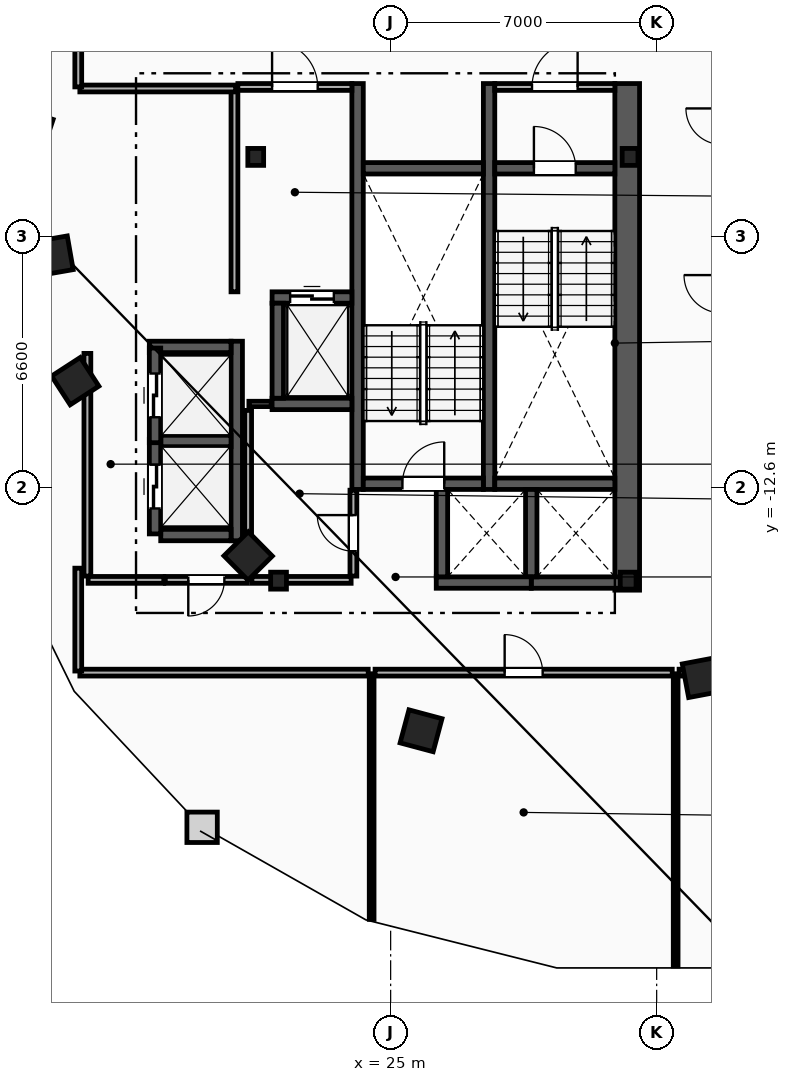
"""IFC4 building model, lengths in metres.
Left out: names, types, materials, properties, quantities, classifications, styles, units other than length and angle.
Written with IfcOpenShell. Run it as: python <this file> out.ifc"""

import sys

from ifc_helpers import new_model, si_unit, direction, frame, frame_2d, origin, origin_2d, place, context, subcontext, project, spatial, rectangle, i_section, extrude, element, fill, save


model = new_model("IFC4")
c1 = context("Model", 3, precision=1e-05, world=origin(), true_north=direction((0.0, 1.0)))
c2 = subcontext(c1, "Body", "Model", "MODEL_VIEW")
j1 = project(units=[si_unit("LENGTHUNIT", "METRE"), si_unit("PLANEANGLEUNIT", "RADIAN")], contexts=[c1])
p1 = place(None, origin())
s1 = spatial("IfcSite", under=j1, at=p1, CompositionType="ELEMENT")
p2 = place(p1, origin())
s2 = spatial("IfcBuilding", under=s1, at=p2, CompositionType="ELEMENT")
p3 = place(p2, frame((0.0, 0.0, 220.6)))
s3 = spatial("IfcBuildingStorey", under=s2, at=p3, CompositionType="ELEMENT", Elevation=220.6)
for number, where, z_axis, x_axis in (
    (1, (31.3, -3.9, 0.0), (0.0, 0.0, 1.0), (1.0, 0.0, 0.0)),
    (2, (21.45, -3.9, 0.0), (0.0, 0.0, 1.0), (1.0, 0.0, 0.0)),
    (3, (22.05, -15.05, 0.0), (0.0, 0.0, 1.0), (1.0, 0.0, 0.0)),
    (4, (31.25, -15.05, 0.0), (0.0, 0.0, 1.0), (1.0, 0.0, 0.0)),
):
    element("IfcColumn", number, at=place(p3, frame(where, z_axis=z_axis, x_axis=x_axis)), inside=s3, PredefinedType="COLUMN", context=c2, shape_type="SweptSolid", body=[
        extrude(i_section(OverallWidth=0.416, OverallDepth=0.446, WebThickness=0.039, FlangeThickness=0.063, FilletRadius=0.018, at=origin_2d()), origin(), (0.0, 0.0, 1.0), 3.6),
    ])
for number, where, z_axis, x_axis in (
    (5, (15.55, -3.2, 0.0), (0.0, 0.0, 1.0), (-0.315, -0.949, 0.0)),
    (6, (16.125, -6.5, 0.0), (0.0, 0.0, 1.0), (0.172, -0.985, 0.0)),
    (7, (16.7, -9.8, 0.0), (0.0, 0.0, 1.0), (0.544, -0.839, 0.0)),
    (8, (21.25, -14.4, 0.0), (0.0, 0.0, 1.0), (0.703, -0.711, 0.0)),
    (9, (25.8, -19.0, 0.0), (0.0, 0.0, 1.0), (0.966, -0.259, 0.0)),
    (10, (33.2, -17.6, 0.0), (0.0, 0.0, 1.0), (0.983, 0.186, 0.0)),
):
    element("IfcColumn", number, at=place(p3, frame(where, z_axis=z_axis, x_axis=x_axis)), inside=s3, PredefinedType="COLUMN", context=c2, shape_type="SweptSolid", body=[
        extrude(rectangle(XDim=0.9, YDim=0.9, at=origin_2d()), origin(), (0.0, 0.0, 1.0), 3.6),
    ])
p4 = place(p3, frame((31.225, -15.3, 0.0), z_axis=(0.0, 0.0, 1.0), x_axis=(0.0, 1.0, 0.0)))
e11 = element("IfcWall", 11, at=p4, inside=s3, PredefinedType="SHEAR", context=c2, shape_type="SweptSolid", body=[
    extrude(rectangle(XDim=13.33, YDim=0.65, at=frame_2d((6.665, 0.0))), origin(), (0.0, 0.0, 1.0), 3.34),
])
for number, where, z_axis, x_axis in (
    (12, (27.59, -12.65, 0.0), (0.0, 0.0, 1.0), (0.0, 1.0, 0.0)),
    (13, (24.13, -12.65, 0.0), (0.0, 0.0, 1.0), (0.0, 1.0, 0.0)),
):
    element("IfcWall", number, at=place(p3, frame(where, z_axis=z_axis, x_axis=x_axis)), inside=s3, PredefinedType="SHEAR", context=c2, shape_type="SweptSolid", body=[
        extrude(rectangle(XDim=10.68, YDim=0.3, at=frame_2d((5.34, 0.0))), origin(), (0.0, 0.0, 1.0), 3.34),
    ])
p5 = place(p3, frame((27.74, -4.2, 0.0), z_axis=(0.0, 0.0, 1.0), x_axis=(1.0, 0.0, 0.0)))
e14 = element("IfcWall", 14, at=p5, inside=s3, PredefinedType="SHEAR", context=c2, shape_type="SweptSolid", body=[
    extrude(rectangle(XDim=3.16, YDim=0.3, at=frame_2d((1.58, 0.0))), origin(), (0.0, 0.0, 1.0), 3.34),
])
p6 = place(p5, frame((1.03, 0.0, 0.0)))
e15 = element("IfcOpeningElement", 15, at=p6, cuts=e14, PredefinedType="OPENING", context=c2, shape_type="SweptSolid", body=[
    extrude(rectangle(XDim=1.1, YDim=2.15, at=frame_2d((0.55, 1.075))), frame((0.0, 0.16, 0.0), z_axis=(0.0, -1.0, 0.0), x_axis=(1.0, 0.0, 0.0)), (0.0, 0.0, 1.0), 0.32),
])
p7 = place(p3, frame((27.74, -12.5, 0.0), z_axis=(0.0, 0.0, 1.0), x_axis=(1.0, 0.0, 0.0)))
e16 = element("IfcWall", 16, at=p7, inside=s3, PredefinedType="SHEAR", context=c2, shape_type="SweptSolid", body=[
    extrude(rectangle(XDim=3.16, YDim=0.3, at=frame_2d((1.58, 0.0))), origin(), (0.0, 0.0, 1.0), 3.34),
])
p8 = place(p3, frame((24.28, -12.5, 0.0), z_axis=(0.0, 0.0, 1.0), x_axis=(1.0, 0.0, 0.0)))
e17 = element("IfcWall", 17, at=p8, inside=s3, PredefinedType="SHEAR", context=c2, shape_type="SweptSolid", body=[
    extrude(rectangle(XDim=3.16, YDim=0.3, at=frame_2d((1.58, 0.0))), origin(), (0.0, 0.0, 1.0), 3.34),
])
p9 = place(p8, frame((1.03, 0.0, 0.0)))
e18 = element("IfcOpeningElement", 18, at=p9, cuts=e17, PredefinedType="OPENING", context=c2, shape_type="SweptSolid", body=[
    extrude(rectangle(XDim=1.1, YDim=2.15, at=frame_2d((0.55, 1.075))), frame((0.0, 0.16, 0.0), z_axis=(0.0, -1.0, 0.0), x_axis=(1.0, 0.0, 0.0)), (0.0, 0.0, 1.0), 0.32),
])
p10 = place(p3, frame((24.28, -4.2, 0.0), z_axis=(0.0, 0.0, 1.0), x_axis=(1.0, 0.0, 0.0)))
e19 = element("IfcWall", 19, at=p10, inside=s3, PredefinedType="SHEAR", context=c2, shape_type="SweptSolid", body=[
    extrude(rectangle(XDim=3.16, YDim=0.3, at=frame_2d((1.58, 0.0))), origin(), (0.0, 0.0, 1.0), 3.34),
])
p11 = place(p3, frame((20.89, -7.45, 0.0), z_axis=(0.0, 0.0, 1.0), x_axis=(0.0, 1.0, 0.0)))
e20 = element("IfcWall", 20, at=p11, inside=s3, PredefinedType="PARTITIONING", context=c2, shape_type="SweptSolid", body=[
    extrude(rectangle(XDim=5.3, YDim=0.18, at=frame_2d((2.65, 0.0))), origin(), (0.0, 0.0, 1.0), 3.34),
])
p12 = place(p3, frame((20.98, -2.06, 0.0), z_axis=(0.0, 0.0, 1.0), x_axis=(1.0, 0.0, 0.0)))
e21 = element("IfcWall", 21, at=p12, inside=s3, PredefinedType="PARTITIONING", context=c2, shape_type="SweptSolid", body=[
    extrude(rectangle(XDim=3.0, YDim=0.18, at=frame_2d((1.5, 0.0))), origin(), (0.0, 0.0, 1.0), 3.34),
])
p13 = place(p12, frame((0.9, 0.0, 0.0)))
e22 = element("IfcOpeningElement", 22, at=p13, cuts=e21, PredefinedType="OPENING", context=c2, shape_type="SweptSolid", body=[
    extrude(rectangle(XDim=1.2, YDim=2.15, at=frame_2d((0.6, 1.075))), frame((0.0, 0.1, 0.0), z_axis=(0.0, -1.0, 0.0), x_axis=(1.0, 0.0, 0.0)), (0.0, 0.0, 1.0), 0.2),
])
p14 = place(p3, frame((27.74, -2.06, 0.0), z_axis=(0.0, 0.0, 1.0), x_axis=(1.0, 0.0, 0.0)))
e23 = element("IfcWall", 23, at=p14, inside=s3, PredefinedType="PARTITIONING", context=c2, shape_type="SweptSolid", body=[
    extrude(rectangle(XDim=3.16, YDim=0.18, at=frame_2d((1.58, 0.0))), origin(), (0.0, 0.0, 1.0), 3.34),
])
p15 = place(p14, frame((0.98, 0.0, 0.0)))
e24 = element("IfcOpeningElement", 24, at=p15, cuts=e23, PredefinedType="OPENING", context=c2, shape_type="SweptSolid", body=[
    extrude(rectangle(XDim=1.2, YDim=2.15, at=frame_2d((0.6, 1.075))), frame((0.0, 0.1, 0.0), z_axis=(0.0, -1.0, 0.0), x_axis=(1.0, 0.0, 0.0)), (0.0, 0.0, 1.0), 0.2),
])
p16 = place(p3, frame((21.88, -7.6, 0.0), z_axis=(0.0, 0.0, 1.0), x_axis=(1.0, 0.0, 0.0)))
e25 = element("IfcWall", 25, at=p16, inside=s3, PredefinedType="SHEAR", context=c2, shape_type="SweptSolid", body=[
    extrude(rectangle(XDim=2.1, YDim=0.3, at=frame_2d((1.05, 0.0))), origin(), (0.0, 0.0, 1.0), 3.34),
])
p17 = place(p16, frame((0.475, 0.0, 0.0)))
e26 = element("IfcOpeningElement", 26, at=p17, cuts=e25, PredefinedType="OPENING", context=c2, shape_type="SweptSolid", body=[
    extrude(rectangle(XDim=1.15, YDim=2.2, at=frame_2d((0.575, 1.1))), frame((0.0, 0.16, 0.0), z_axis=(0.0, -1.0, 0.0), x_axis=(1.0, 0.0, 0.0)), (0.0, 0.0, 1.0), 0.32),
])
p18 = place(p3, frame((21.88, -10.4, 0.0), z_axis=(0.0, 0.0, 1.0), x_axis=(1.0, 0.0, 0.0)))
e27 = element("IfcWall", 27, at=p18, inside=s3, PredefinedType="SHEAR", context=c2, shape_type="SweptSolid", body=[
    extrude(rectangle(XDim=2.1, YDim=0.3, at=frame_2d((1.05, 0.0))), origin(), (0.0, 0.0, 1.0), 3.34),
])
for number, where, z_axis, x_axis in (
    (28, (22.03, -10.25, 0.0), (0.0, 0.0, 1.0), (0.0, 1.0, 0.0)),
    (29, (28.7, -15.1, 0.0), (0.0, 0.0, 1.0), (1.0, 0.0, 0.0)),
):
    element("IfcWall", number, at=place(p3, frame(where, z_axis=z_axis, x_axis=x_axis)), inside=s3, PredefinedType="SHEAR", context=c2, shape_type="SweptSolid", body=[
        extrude(rectangle(XDim=2.5, YDim=0.3, at=frame_2d((1.25, 0.0))), origin(), (0.0, 0.0, 1.0), 3.34),
    ])
p19 = place(p3, frame((28.7, -14.95, 0.0), z_axis=(0.0, 0.0, 1.0), x_axis=(0.0, 1.0, 0.0)))
e30 = element("IfcWall", 30, at=p19, inside=s3, PredefinedType="SHEAR", context=c2, shape_type="SweptSolid", body=[
    extrude(rectangle(XDim=2.3, YDim=0.3, at=frame_2d((1.15, 0.0))), origin(), (0.0, 0.0, 1.0), 3.34),
])
p20 = place(p3, frame((26.2, -15.1, 0.0), z_axis=(0.0, 0.0, 1.0), x_axis=(1.0, 0.0, 0.0)))
e31 = element("IfcWall", 31, at=p20, inside=s3, PredefinedType="SHEAR", context=c2, shape_type="SweptSolid", body=[
    extrude(rectangle(XDim=2.5, YDim=0.3, at=frame_2d((1.25, 0.0))), origin(), (0.0, 0.0, 1.0), 3.34),
])
p21 = place(p3, frame((26.35, -14.95, 0.0), z_axis=(0.0, 0.0, 1.0), x_axis=(0.0, 1.0, 0.0)))
e32 = element("IfcWall", 32, at=p21, inside=s3, PredefinedType="SHEAR", context=c2, shape_type="SweptSolid", body=[
    extrude(rectangle(XDim=2.3, YDim=0.3, at=frame_2d((1.15, 0.0))), origin(), (0.0, 0.0, 1.0), 3.34),
])
p22 = place(p3, frame((20.95, -14.0, 0.0), z_axis=(0.0, 0.0, 1.0), x_axis=(0.0, 1.0, 0.0)))
e33 = element("IfcWall", 33, at=p22, inside=s3, PredefinedType="SHEAR", context=c2, shape_type="SweptSolid", body=[
    extrude(rectangle(XDim=5.25, YDim=0.3, at=frame_2d((2.625, 0.0))), origin(), (0.0, 0.0, 1.0), 3.34),
])
p23 = place(p3, frame((18.95, -13.85, 0.0), z_axis=(0.0, 0.0, 1.0), x_axis=(1.0, 0.0, 0.0)))
e34 = element("IfcWall", 34, at=p23, inside=s3, PredefinedType="SHEAR", context=c2, shape_type="SweptSolid", body=[
    extrude(rectangle(XDim=1.85, YDim=0.3, at=frame_2d((0.925, 0.0))), origin(), (0.0, 0.0, 1.0), 3.34),
])
p24 = place(p3, frame((18.65, -8.9, 0.0), z_axis=(0.0, 0.0, 1.0), x_axis=(1.0, 0.0, 0.0)))
e35 = element("IfcWall", 35, at=p24, inside=s3, PredefinedType="SHEAR", context=c2, shape_type="SweptSolid", body=[
    extrude(rectangle(XDim=2.15, YDim=0.3, at=frame_2d((1.075, 0.0))), origin(), (0.0, 0.0, 1.0), 3.34),
])
p25 = place(p3, frame((18.95, -11.375, 0.0), z_axis=(0.0, 0.0, 1.0), x_axis=(1.0, 0.0, 0.0)))
e36 = element("IfcWall", 36, at=p25, inside=s3, PredefinedType="SHEAR", context=c2, shape_type="SweptSolid", body=[
    extrude(rectangle(XDim=1.85, YDim=0.3, at=frame_2d((0.925, 0.0))), origin(), (0.0, 0.0, 1.0), 3.34),
])
p26 = place(p3, frame((18.8, -13.82, 0.0), z_axis=(0.0, 0.0, 1.0), x_axis=(0.0, 1.0, 0.0)))
e37 = element("IfcWall", 37, at=p26, inside=s3, PredefinedType="SHEAR", context=c2, shape_type="SweptSolid", body=[
    extrude(rectangle(XDim=2.49, YDim=0.3, at=frame_2d((1.245, 0.0))), origin(), (0.0, 0.0, 1.0), 3.34),
])
p27 = place(p26, frame((0.67, 0.0, 0.0)))
e38 = element("IfcOpeningElement", 38, at=p27, cuts=e37, PredefinedType="OPENING", context=c2, shape_type="SweptSolid", body=[
    extrude(rectangle(XDim=1.15, YDim=2.2, at=frame_2d((0.575, 1.1))), frame((0.0, 0.16, 0.0), z_axis=(0.0, -1.0, 0.0), x_axis=(1.0, 0.0, 0.0)), (0.0, 0.0, 1.0), 0.32),
])
p28 = place(p3, frame((18.8, -11.42, 0.0), z_axis=(0.0, 0.0, 1.0), x_axis=(0.0, 1.0, 0.0)))
e39 = element("IfcWall", 39, at=p28, inside=s3, PredefinedType="SHEAR", context=c2, shape_type="SweptSolid", body=[
    extrude(rectangle(XDim=2.49, YDim=0.3, at=frame_2d((1.245, 0.0))), origin(), (0.0, 0.0, 1.0), 3.34),
])
p29 = place(p28, frame((0.67, 0.0, 0.0)))
e40 = element("IfcOpeningElement", 40, at=p29, cuts=e39, PredefinedType="OPENING", context=c2, shape_type="SweptSolid", body=[
    extrude(rectangle(XDim=1.15, YDim=2.2, at=frame_2d((0.575, 1.1))), frame((0.0, 0.16, 0.0), z_axis=(0.0, -1.0, 0.0), x_axis=(1.0, 0.0, 0.0)), (0.0, 0.0, 1.0), 0.32),
])
p30 = place(p3, frame((17.02, -14.93, 0.0), z_axis=(0.0, 0.0, 1.0), x_axis=(0.0, 1.0, 0.0)))
e41 = element("IfcWall", 41, at=p30, inside=s3, PredefinedType="PARTITIONING", context=c2, shape_type="SweptSolid", body=[
    extrude(rectangle(XDim=5.86, YDim=0.18, at=frame_2d((2.93, 0.0))), origin(), (0.0, 0.0, 1.0), 3.34),
])
p31 = place(p3, frame((17.04, -15.03, 0.0), z_axis=(0.0, 0.0, 1.0), x_axis=(1.0, 0.0, 0.0)))
e42 = element("IfcWall", 42, at=p31, inside=s3, PredefinedType="PARTITIONING", context=c2, shape_type="SweptSolid", body=[
    extrude(rectangle(XDim=1.99, YDim=0.18, at=frame_2d((0.995, 0.0))), origin(), (0.0, 0.0, 1.0), 3.34),
])
p32 = place(p3, frame((21.23, -15.03, 0.0), z_axis=(0.0, 0.0, 1.0), x_axis=(-1.0, 0.0, 0.0)))
e43 = element("IfcWall", 43, at=p32, inside=s3, PredefinedType="PARTITIONING", context=c2, shape_type="SweptSolid", body=[
    extrude(rectangle(XDim=2.16, YDim=0.18, at=frame_2d((1.08, 0.0))), origin(), (0.0, 0.0, 1.0), 3.34),
])
p33 = place(p32, frame((0.605, 0.0, 0.0)))
e44 = element("IfcOpeningElement", 44, at=p33, cuts=e43, PredefinedType="OPENING", context=c2, shape_type="SweptSolid", body=[
    extrude(rectangle(XDim=0.95, YDim=2.1, at=frame_2d((0.475, 1.05))), frame((0.0, 0.1, 0.0), z_axis=(0.0, -1.0, 0.0), x_axis=(1.0, 0.0, 0.0)), (0.0, 0.0, 1.0), 0.2),
])
p34 = place(p3, frame((21.27, -10.4, 0.0), z_axis=(0.0, 0.0, 1.0), x_axis=(1.0, 0.0, 0.0)))
e45 = element("IfcWall", 45, at=p34, inside=s3, PredefinedType="PARTITIONING", context=c2, shape_type="SweptSolid", body=[
    extrude(rectangle(XDim=0.59, YDim=0.14, at=frame_2d((0.295, 0.0))), origin(), (0.0, 0.0, 1.0), 3.34),
])
p35 = place(p3, frame((21.25, -14.93, 0.0), z_axis=(0.0, 0.0, 1.0), x_axis=(0.0, 1.0, 0.0)))
e46 = element("IfcWall", 46, at=p35, inside=s3, PredefinedType="PARTITIONING", context=c2, shape_type="SweptSolid", body=[
    extrude(rectangle(XDim=4.36, YDim=0.18, at=frame_2d((2.18, 0.0))), origin(), (0.0, 0.0, 1.0), 3.34),
])
p36 = place(p3, frame((21.35, -15.03, 0.0), z_axis=(0.0, 0.0, 1.0), x_axis=(1.0, 0.0, 0.0)))
e47 = element("IfcWall", 47, at=p36, inside=s3, PredefinedType="PARTITIONING", context=c2, shape_type="SweptSolid", body=[
    extrude(rectangle(XDim=2.61, YDim=0.18, at=frame_2d((1.305, 0.0))), origin(), (0.0, 0.0, 1.0), 2.413),
])
p37 = place(p3, frame((24.02, -14.93, 0.0), z_axis=(0.0, 0.0, 1.0), x_axis=(0.0, 1.0, 0.0)))
e48 = element("IfcWall", 48, at=p37, inside=s3, PredefinedType="PARTITIONING", context=c2, shape_type="SweptSolid", body=[
    extrude(rectangle(XDim=2.26, YDim=0.18, at=frame_2d((1.13, 0.0))), origin(), (0.0, 0.0, 1.0), 3.34),
])
p38 = place(p37, frame((0.655, 0.0, 0.0)))
e49 = element("IfcOpeningElement", 49, at=p38, cuts=e48, PredefinedType="OPENING", context=c2, shape_type="SweptSolid", body=[
    extrude(rectangle(XDim=0.95, YDim=2.1, at=frame_2d((0.475, 1.05))), frame((0.0, 0.1, 0.0), z_axis=(0.0, -1.0, 0.0), x_axis=(1.0, 0.0, 0.0)), (0.0, 0.0, 1.0), 0.2),
])
p39 = place(p3, frame((24.5, -23.963, 0.0), z_axis=(0.0, 0.0, 1.0), x_axis=(0.0, 1.0, 0.0)))
e50 = element("IfcWall", 50, at=p39, inside=s3, PredefinedType="PARTITIONING", context=c2, shape_type="SweptSolid", body=[
    extrude(rectangle(XDim=6.463, YDim=0.125, at=frame_2d((3.231, 0.0))), origin(), (0.0, 0.0, 1.0), 3.34),
])
p40 = place(p3, frame((32.5, -25.19, 0.0), z_axis=(0.0, 0.0, 1.0), x_axis=(0.0, 1.0, 0.0)))
e51 = element("IfcWall", 51, at=p40, inside=s3, PredefinedType="PARTITIONING", context=c2, shape_type="SweptSolid", body=[
    extrude(rectangle(XDim=7.69, YDim=0.125, at=frame_2d((3.845, 0.0))), origin(), (0.0, 0.0, 1.0), 3.34),
])
p41 = place(p3, frame((24.59, -17.47, 0.0), z_axis=(0.0, 0.0, 1.0), x_axis=(1.0, 0.0, 0.0)))
e52 = element("IfcWall", 52, at=p41, inside=s3, PredefinedType="PARTITIONING", context=c2, shape_type="SweptSolid", body=[
    extrude(rectangle(XDim=7.82, YDim=0.18, at=frame_2d((3.91, 0.0))), origin(), (0.0, 0.0, 1.0), 3.34),
])
p42 = place(p41, frame((3.41, 0.0, 0.0)))
e53 = element("IfcOpeningElement", 53, at=p42, cuts=e52, PredefinedType="OPENING", context=c2, shape_type="SweptSolid", body=[
    extrude(rectangle(XDim=1.0, YDim=2.15, at=frame_2d((0.5, 1.075))), frame((0.0, 0.1, 0.0), z_axis=(0.0, -1.0, 0.0), x_axis=(1.0, 0.0, 0.0)), (0.0, 0.0, 1.0), 0.2),
])
p43 = place(p3, frame((32.59, -17.47, 0.0), z_axis=(0.0, 0.0, 1.0), x_axis=(1.0, 0.0, 0.0)))
e54 = element("IfcWall", 54, at=p43, inside=s3, PredefinedType="PARTITIONING", context=c2, shape_type="SweptSolid", body=[
    extrude(rectangle(XDim=1.038, YDim=0.18, at=frame_2d((0.519, 0.0))), origin(), (0.0, 0.0, 1.0), 3.34),
])
p44 = place(p3, frame((16.822, -17.47, 0.0), z_axis=(0.0, 0.0, 1.0), x_axis=(1.0, 0.0, 0.0)))
e55 = element("IfcWall", 55, at=p44, inside=s3, PredefinedType="PARTITIONING", context=c2, shape_type="SweptSolid", body=[
    extrude(rectangle(XDim=7.588, YDim=0.18, at=frame_2d((3.794, 0.0))), origin(), (0.0, 0.0, 1.0), 3.34),
])
p45 = place(p3, frame((16.822, -2.1, 0.0), z_axis=(0.0, 0.0, 1.0), x_axis=(1.0, 0.0, 0.0)))
e56 = element("IfcWall", 56, at=p45, inside=s3, PredefinedType="PARTITIONING", context=c2, shape_type="SweptSolid", body=[
    extrude(rectangle(XDim=4.098, YDim=0.18, at=frame_2d((2.049, 0.0))), origin(), (0.0, 0.0, 1.0), 3.34),
])
p46 = place(p3, frame((16.78, -14.721, 0.0), z_axis=(0.0, 0.0, 1.0), x_axis=(0.0, -1.0, 0.0)))
e57 = element("IfcWall", 57, at=p46, inside=s3, PredefinedType="PARTITIONING", context=c2, shape_type="SweptSolid", body=[
    extrude(rectangle(XDim=2.707, YDim=0.18, at=frame_2d((1.354, 0.0))), origin(), (0.0, 0.0, 1.0), 3.34),
])
p47 = place(p3, frame((16.78, 0.329, 0.0), z_axis=(0.0, 0.0, 1.0), x_axis=(0.0, -1.0, 0.0)))
e58 = element("IfcWall", 58, at=p47, inside=s3, PredefinedType="PARTITIONING", context=c2, shape_type="SweptSolid", body=[
    extrude(rectangle(XDim=2.387, YDim=0.18, at=frame_2d((1.194, 0.0))), origin(), (0.0, 0.0, 1.0), 3.34),
])
p48 = place(p6, origin())
e59 = element("IfcDoor", 59, at=p48, inside=s3, OperationType="SINGLE_SWING_LEFT", PredefinedType="DOOR", context=c2, shape_type="SweptSolid", body=[
    extrude(rectangle(XDim=1.1, YDim=2.15, at=frame_2d((0.55, 1.075))), frame((0.0, 0.025, 0.0), z_axis=(0.0, -1.0, 0.0), x_axis=(1.0, 0.0, 0.0)), (0.0, 0.0, 1.0), 0.05),
])
fill(e15, e59)
p49 = place(p9, origin())
e60 = element("IfcDoor", 60, at=p49, inside=s3, OperationType="SINGLE_SWING_RIGHT", PredefinedType="DOOR", context=c2, shape_type="SweptSolid", body=[
    extrude(rectangle(XDim=1.1, YDim=2.15, at=frame_2d((0.55, 1.075))), frame((0.0, 0.025, 0.0), z_axis=(0.0, -1.0, 0.0), x_axis=(1.0, 0.0, 0.0)), (0.0, 0.0, 1.0), 0.05),
])
fill(e18, e60)
p50 = place(p13, origin())
e61 = element("IfcDoor", 61, at=p50, inside=s3, OperationType="SINGLE_SWING_LEFT", PredefinedType="DOOR", context=c2, shape_type="SweptSolid", body=[
    extrude(rectangle(XDim=1.2, YDim=2.15, at=frame_2d((0.6, 1.075))), frame((0.0, 0.025, 0.0), z_axis=(0.0, -1.0, 0.0), x_axis=(1.0, 0.0, 0.0)), (0.0, 0.0, 1.0), 0.05),
])
fill(e22, e61)
p51 = place(p15, origin())
e62 = element("IfcDoor", 62, at=p51, inside=s3, OperationType="SINGLE_SWING_RIGHT", PredefinedType="DOOR", context=c2, shape_type="SweptSolid", body=[
    extrude(rectangle(XDim=1.2, YDim=2.15, at=frame_2d((0.6, 1.075))), frame((0.0, 0.025, 0.0), z_axis=(0.0, -1.0, 0.0), x_axis=(1.0, 0.0, 0.0)), (0.0, 0.0, 1.0), 0.05),
])
fill(e24, e62)
p52 = place(p17, origin())
e63 = element("IfcDoor", 63, at=p52, inside=s3, OperationType="SLIDING_TO_LEFT", PredefinedType="TRAPDOOR", context=c2, shape_type="SweptSolid", body=[
    extrude(rectangle(XDim=1.15, YDim=2.2, at=frame_2d((0.575, 1.1))), frame((0.0, 0.025, 0.0), z_axis=(0.0, -1.0, 0.0), x_axis=(1.0, 0.0, 0.0)), (0.0, 0.0, 1.0), 0.05),
])
fill(e26, e63)
p53 = place(p27, origin())
e64 = element("IfcDoor", 64, at=p53, inside=s3, OperationType="SLIDING_TO_LEFT", PredefinedType="TRAPDOOR", context=c2, shape_type="SweptSolid", body=[
    extrude(rectangle(XDim=1.15, YDim=2.2, at=frame_2d((0.575, 1.1))), frame((0.0, 0.025, 0.0), z_axis=(0.0, -1.0, 0.0), x_axis=(1.0, 0.0, 0.0)), (0.0, 0.0, 1.0), 0.05),
])
fill(e38, e64)
p54 = place(p29, origin())
e65 = element("IfcDoor", 65, at=p54, inside=s3, OperationType="SLIDING_TO_LEFT", PredefinedType="TRAPDOOR", context=c2, shape_type="SweptSolid", body=[
    extrude(rectangle(XDim=1.15, YDim=2.2, at=frame_2d((0.575, 1.1))), frame((0.0, 0.025, 0.0), z_axis=(0.0, -1.0, 0.0), x_axis=(1.0, 0.0, 0.0)), (0.0, 0.0, 1.0), 0.05),
])
fill(e40, e65)
p55 = place(p42, origin())
e66 = element("IfcDoor", 66, at=p55, inside=s3, OperationType="SINGLE_SWING_LEFT", PredefinedType="DOOR", context=c2, shape_type="SweptSolid", body=[
    extrude(rectangle(XDim=1.0, YDim=2.15, at=frame_2d((0.5, 1.075))), frame((0.0, 0.025, 0.0), z_axis=(0.0, -1.0, 0.0), x_axis=(1.0, 0.0, 0.0)), (0.0, 0.0, 1.0), 0.05),
])
fill(e53, e66)
p56 = place(p38, origin())
e67 = element("IfcDoor", 67, at=p56, inside=s3, OperationType="SINGLE_SWING_RIGHT", PredefinedType="DOOR", context=c2, shape_type="SweptSolid", body=[
    extrude(rectangle(XDim=0.95, YDim=2.1, at=frame_2d((0.475, 1.05))), frame((0.0, 0.025, 0.0), z_axis=(0.0, -1.0, 0.0), x_axis=(1.0, 0.0, 0.0)), (0.0, 0.0, 1.0), 0.05),
])
fill(e49, e67)
p57 = place(p33, origin())
e68 = element("IfcDoor", 68, at=p57, inside=s3, OperationType="SINGLE_SWING_RIGHT", PredefinedType="DOOR", context=c2, shape_type="SweptSolid", body=[
    extrude(rectangle(XDim=0.95, YDim=2.1, at=frame_2d((0.475, 1.05))), frame((0.0, 0.025, 0.0), z_axis=(0.0, -1.0, 0.0), x_axis=(1.0, 0.0, 0.0)), (0.0, 0.0, 1.0), 0.05),
])
fill(e44, e68)
save(model, sys.argv[1])
